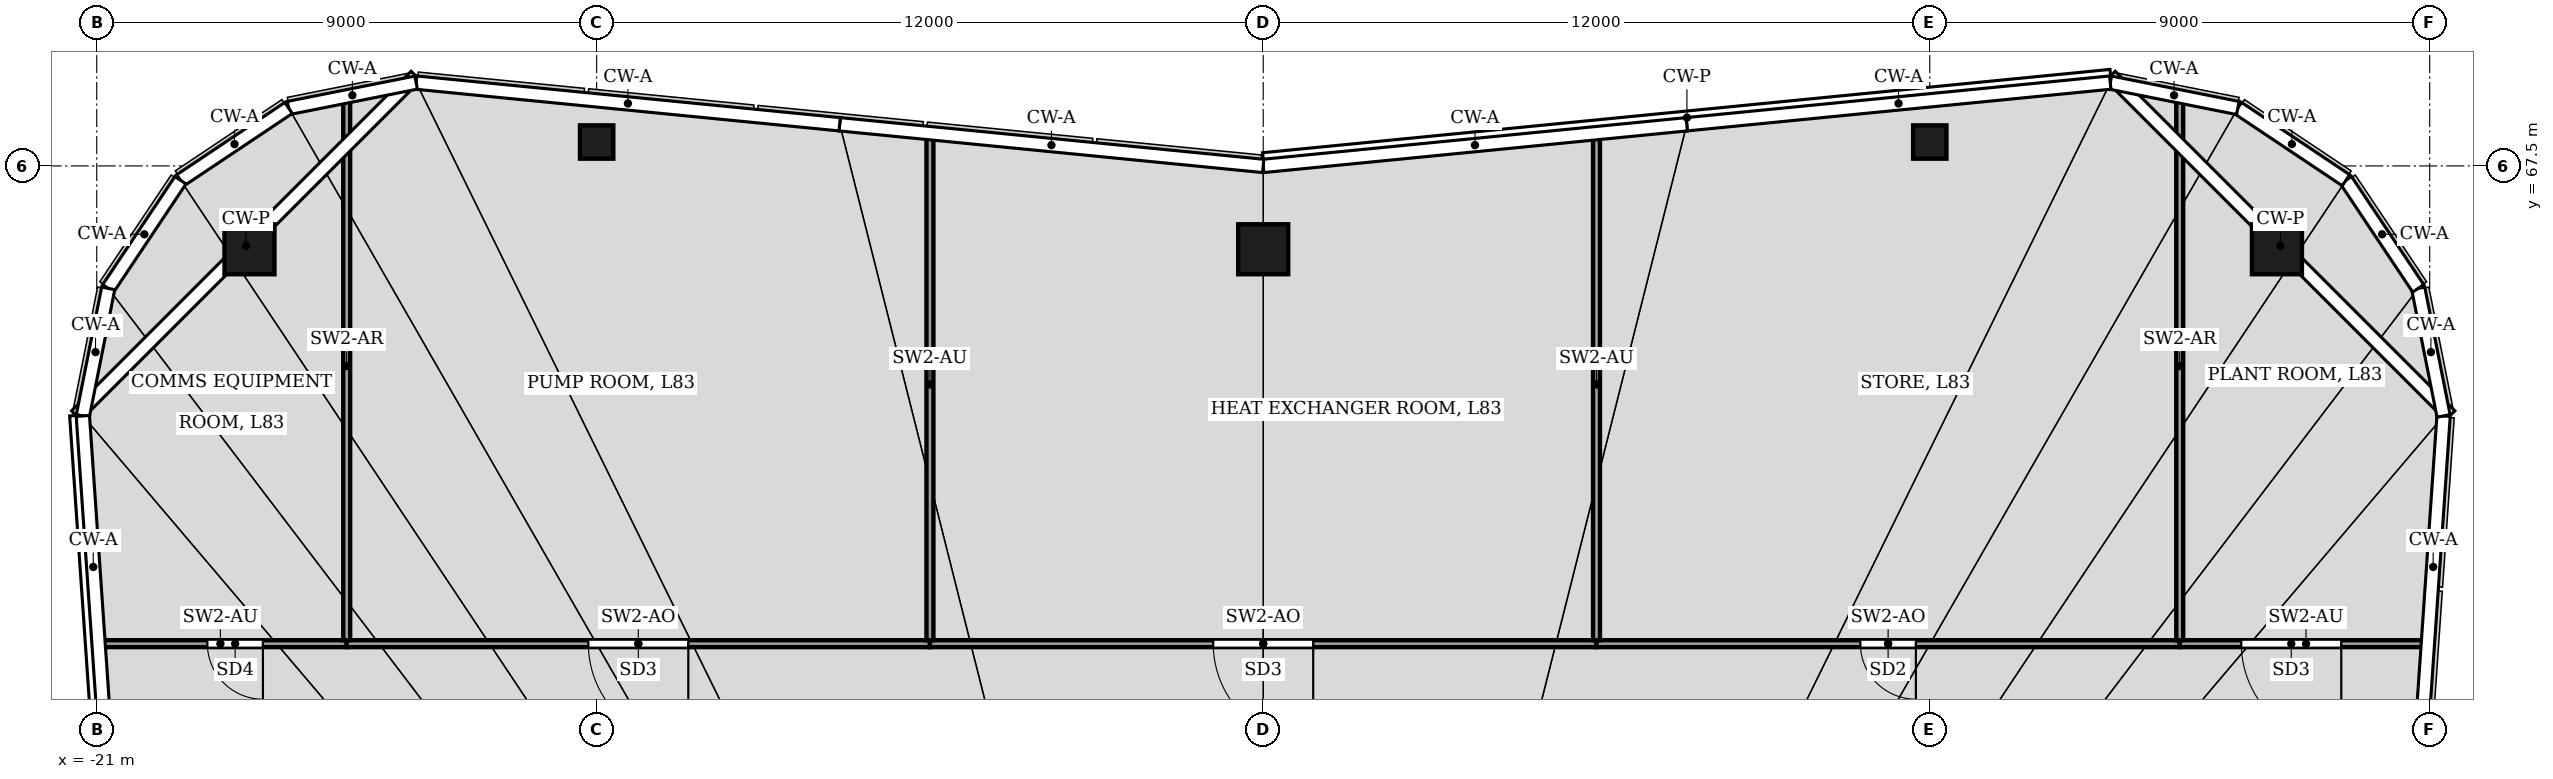
"""IFC4 building model, lengths in metres.
Left out: names, types, materials, properties, quantities, classifications, styles, units other than length and angle.
Written with IfcOpenShell. Run it as: python <this file> out.ifc"""

import sys

from ifc_helpers import new_model, si_unit, direction, frame, frame_2d, origin, origin_2d, place, context, subcontext, project, spatial, rectangle, hollow_rectangle, extrude, element, fill, save


model = new_model("IFC4")
c1 = context("Model", 3, precision=1e-05, world=origin(), true_north=direction((0.0, 1.0)))
c2 = subcontext(c1, "Body", "Model", "MODEL_VIEW")
j1 = project(units=[si_unit("LENGTHUNIT", "METRE"), si_unit("PLANEANGLEUNIT", "RADIAN")], contexts=[c1])
p1 = place(None, origin())
s1 = spatial("IfcSite", under=j1, at=p1, CompositionType="ELEMENT")
p2 = place(p1, origin())
s2 = spatial("IfcBuilding", under=s1, at=p2, CompositionType="ELEMENT")
p3 = place(p2, frame((0.0, 0.0, 368.0)))
s3 = spatial("IfcBuildingStorey", under=s2, at=p3, CompositionType="ELEMENT", Elevation=368.0)
for number, where, z_axis, x_axis in (
    (1, (-18.25, 66.0, 0.0), (0.0, 0.0, 1.0), (1.0, 0.0, 0.0)),
    (2, (0.0, 66.0, 0.0), (0.0, 0.0, 1.0), (1.0, 0.0, 0.0)),
    (3, (18.25, 66.0, 0.0), (0.0, 0.0, 1.0), (1.0, 0.0, 0.0)),
):
    element("IfcColumn", number, at=place(p3, frame(where, z_axis=z_axis, x_axis=x_axis)), inside=s3, PredefinedType="COLUMN", context=c2, shape_type="SweptSolid", body=[
        extrude(hollow_rectangle(XDim=0.9, YDim=0.9, WallThickness=0.04, at=origin_2d()), origin(), (0.0, 0.0, 1.0), 3.3),
    ])
for number, where, z_axis, x_axis in (
    (4, (-12.0, 67.93, 0.0), (0.0, 0.0, 1.0), (1.0, 0.0, 0.0)),
    (5, (12.0, 67.93, 0.0), (0.0, 0.0, 1.0), (1.0, 0.0, 0.0)),
):
    element("IfcColumn", number, at=place(p3, frame(where, z_axis=z_axis, x_axis=x_axis)), inside=s3, PredefinedType="COLUMN", context=c2, shape_type="SweptSolid", body=[
        extrude(hollow_rectangle(XDim=0.6, YDim=0.6, WallThickness=0.025, at=origin_2d()), origin(), (0.0, 0.0, 1.0), 3.3),
    ])
p4 = place(p3, frame((-16.5, 58.9, 0.0), z_axis=(0.0, 0.0, 1.0), x_axis=(-1.0, 0.0, 0.0)))
e6 = element("IfcWall", 6, at=p4, inside=s3, PredefinedType="PARTITIONING", context=c2, shape_type="SweptSolid", body=[
    extrude(rectangle(XDim=4.547, YDim=0.125, at=frame_2d((2.273, 0.0))), origin(), (0.0, 0.0, 1.0), 2.47),
])
p5 = place(p4, frame((1.508, 0.0, 0.0)))
e7 = element("IfcOpeningElement", 7, at=p5, cuts=e6, PredefinedType="OPENING", context=c2, shape_type="SweptSolid", body=[
    extrude(rectangle(XDim=1.0, YDim=2.1, at=frame_2d((0.5, 1.05))), frame((0.0, 0.073, 0.0), z_axis=(0.0, -1.0, 0.0), x_axis=(1.0, 0.0, 0.0)), (0.0, 0.0, 1.0), 0.145),
])
p6 = place(p3, frame((-6.0, 58.9, 0.0), z_axis=(0.0, 0.0, 1.0), x_axis=(-1.0, 0.0, 0.0)))
e8 = element("IfcWall", 8, at=p6, inside=s3, PredefinedType="PARTITIONING", context=c2, shape_type="SweptSolid", body=[
    extrude(rectangle(XDim=10.5, YDim=0.125, at=frame_2d((5.25, 0.0))), origin(), (0.0, 0.0, 1.0), 2.67),
])
p7 = place(p6, frame((4.35, 0.0, 0.0)))
e9 = element("IfcOpeningElement", 9, at=p7, cuts=e8, PredefinedType="OPENING", context=c2, shape_type="SweptSolid", body=[
    extrude(rectangle(XDim=1.8, YDim=2.4, at=frame_2d((0.9, 1.2))), frame((0.0, 0.073, 0.0), z_axis=(0.0, -1.0, 0.0), x_axis=(1.0, 0.0, 0.0)), (0.0, 0.0, 1.0), 0.145),
])
p8 = place(p3, frame((6.0, 58.9, 0.0), z_axis=(0.0, 0.0, 1.0), x_axis=(-1.0, 0.0, 0.0)))
e10 = element("IfcWall", 10, at=p8, inside=s3, PredefinedType="PARTITIONING", context=c2, shape_type="SweptSolid", body=[
    extrude(rectangle(XDim=12.0, YDim=0.125, at=frame_2d((6.0, 0.0))), origin(), (0.0, 0.0, 1.0), 2.67),
])
p9 = place(p8, frame((5.1, 0.0, 0.0)))
e11 = element("IfcOpeningElement", 11, at=p9, cuts=e10, PredefinedType="OPENING", context=c2, shape_type="SweptSolid", body=[
    extrude(rectangle(XDim=1.8, YDim=2.4, at=frame_2d((0.9, 1.2))), frame((0.0, 0.073, 0.0), z_axis=(0.0, -1.0, 0.0), x_axis=(1.0, 0.0, 0.0)), (0.0, 0.0, 1.0), 0.145),
])
p10 = place(p3, frame((16.5, 58.9, 0.0), z_axis=(0.0, 0.0, 1.0), x_axis=(-1.0, 0.0, 0.0)))
e12 = element("IfcWall", 12, at=p10, inside=s3, PredefinedType="PARTITIONING", context=c2, shape_type="SweptSolid", body=[
    extrude(rectangle(XDim=10.5, YDim=0.125, at=frame_2d((5.25, 0.0))), origin(), (0.0, 0.0, 1.0), 2.67),
])
p11 = place(p10, frame((4.75, 0.0, 0.0)))
e13 = element("IfcOpeningElement", 13, at=p11, cuts=e12, PredefinedType="OPENING", context=c2, shape_type="SweptSolid", body=[
    extrude(rectangle(XDim=1.0, YDim=2.1, at=frame_2d((0.5, 1.05))), frame((0.0, 0.073, 0.0), z_axis=(0.0, -1.0, 0.0), x_axis=(1.0, 0.0, 0.0)), (0.0, 0.0, 1.0), 0.145),
])
p12 = place(p3, frame((21.047, 58.9, 0.0), z_axis=(0.0, 0.0, 1.0), x_axis=(-1.0, 0.0, 0.0)))
e14 = element("IfcWall", 14, at=p12, inside=s3, PredefinedType="PARTITIONING", context=c2, shape_type="SweptSolid", body=[
    extrude(rectangle(XDim=4.547, YDim=0.125, at=frame_2d((2.273, 0.0))), origin(), (0.0, 0.0, 1.0), 2.47),
])
p13 = place(p12, frame((1.639, 0.0, 0.0)))
e15 = element("IfcOpeningElement", 15, at=p13, cuts=e14, PredefinedType="OPENING", context=c2, shape_type="SweptSolid", body=[
    extrude(rectangle(XDim=1.8, YDim=2.4, at=frame_2d((0.9, 1.2))), frame((0.0, 0.073, 0.0), z_axis=(0.0, -1.0, 0.0), x_axis=(1.0, 0.0, 0.0)), (0.0, 0.0, 1.0), 0.145),
])
p14 = place(p3, frame((-16.5, 68.831, 0.0), z_axis=(0.0, 0.0, 1.0), x_axis=(0.0, -1.0, 0.0)))
e16 = element("IfcWall", 16, at=p14, inside=s3, PredefinedType="PARTITIONING", context=c2, shape_type="SweptSolid", body=[
    extrude(rectangle(XDim=9.869, YDim=0.125, at=frame_2d((4.935, 0.0))), origin(), (0.0, 0.0, 1.0), 2.262),
])
for number, where, z_axis, x_axis in (
    (17, (-6.0, 68.17, 0.0), (0.0, 0.0, 1.0), (0.0, -1.0, 0.0)),
    (18, (6.0, 68.17, 0.0), (0.0, 0.0, 1.0), (0.0, -1.0, 0.0)),
):
    element("IfcWall", number, at=place(p3, frame(where, z_axis=z_axis, x_axis=x_axis)), inside=s3, PredefinedType="PARTITIONING", context=c2, shape_type="SweptSolid", body=[
        extrude(rectangle(XDim=9.208, YDim=0.125, at=frame_2d((4.604, 0.0))), origin(), (0.0, 0.0, 1.0), 2.47),
    ])
p15 = place(p3, frame((16.5, 68.831, 0.0), z_axis=(0.0, 0.0, 1.0), x_axis=(0.0, -1.0, 0.0)))
e19 = element("IfcWall", 19, at=p15, inside=s3, PredefinedType="PARTITIONING", context=c2, shape_type="SweptSolid", body=[
    extrude(rectangle(XDim=9.869, YDim=0.125, at=frame_2d((4.935, 0.0))), origin(), (0.0, 0.0, 1.0), 2.262),
])
p16 = place(p5, origin())
e20 = element("IfcDoor", 20, at=p16, inside=s3, OperationType="SINGLE_SWING_LEFT", PredefinedType="DOOR", context=c2, shape_type="SweptSolid", body=[
    extrude(rectangle(XDim=1.0, YDim=2.1, at=frame_2d((0.5, 1.05))), frame((0.0, 0.025, 0.0), z_axis=(0.0, -1.0, 0.0), x_axis=(1.0, 0.0, 0.0)), (0.0, 0.0, 1.0), 0.05),
])
fill(e7, e20)
p17 = place(p7, origin())
e21 = element("IfcDoor", 21, at=p17, inside=s3, OperationType="DOUBLE_DOOR_SINGLE_SWING", PredefinedType="DOOR", context=c2, shape_type="SweptSolid", body=[
    extrude(rectangle(XDim=1.8, YDim=2.4, at=frame_2d((0.9, 1.2))), frame((0.0, 0.025, 0.0), z_axis=(0.0, -1.0, 0.0), x_axis=(1.0, 0.0, 0.0)), (0.0, 0.0, 1.0), 0.05),
])
fill(e9, e21)
p18 = place(p9, origin())
e22 = element("IfcDoor", 22, at=p18, inside=s3, OperationType="DOUBLE_DOOR_SINGLE_SWING", PredefinedType="DOOR", context=c2, shape_type="SweptSolid", body=[
    extrude(rectangle(XDim=1.8, YDim=2.4, at=frame_2d((0.9, 1.2))), frame((0.0, 0.025, 0.0), z_axis=(0.0, -1.0, 0.0), x_axis=(1.0, 0.0, 0.0)), (0.0, 0.0, 1.0), 0.05),
])
fill(e11, e22)
p19 = place(p11, origin())
e23 = element("IfcDoor", 23, at=p19, inside=s3, OperationType="SINGLE_SWING_LEFT", PredefinedType="DOOR", context=c2, shape_type="SweptSolid", body=[
    extrude(rectangle(XDim=1.0, YDim=2.1, at=frame_2d((0.5, 1.05))), frame((0.0, 0.025, 0.0), z_axis=(0.0, -1.0, 0.0), x_axis=(1.0, 0.0, 0.0)), (0.0, 0.0, 1.0), 0.05),
])
fill(e13, e23)
p20 = place(p13, origin())
e24 = element("IfcDoor", 24, at=p20, inside=s3, OperationType="DOUBLE_DOOR_SINGLE_SWING", PredefinedType="DOOR", context=c2, shape_type="SweptSolid", body=[
    extrude(rectangle(XDim=1.8, YDim=2.4, at=frame_2d((0.9, 1.2))), frame((0.0, 0.025, 0.0), z_axis=(0.0, -1.0, 0.0), x_axis=(1.0, 0.0, 0.0)), (0.0, 0.0, 1.0), 0.05),
])
fill(e15, e24)
save(model, sys.argv[1])
